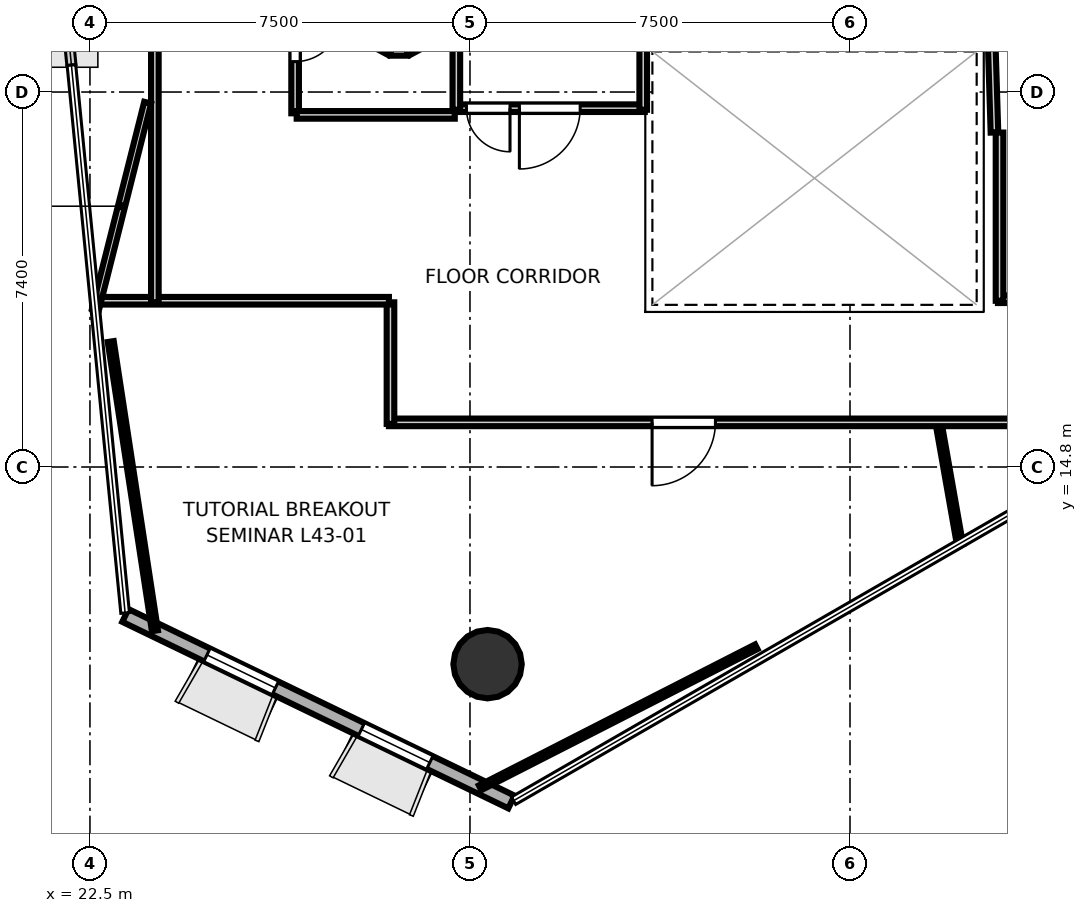
"""IFC4 building model, lengths in metres.
Left out: names, types, materials, properties, quantities, classifications, styles, units other than length and angle.
Written with IfcOpenShell. Run it as: python <this file> out.ifc"""

import sys

from ifc_helpers import new_model, si_unit, direction, frame, frame_2d, origin, origin_2d, place, context, subcontext, project, spatial, rectangle, hollow_circle, extrude, element, fill, save


model = new_model("IFC4")
c1 = context("Model", 3, precision=1e-05, world=origin(), true_north=direction((0.0, 1.0)))
c2 = subcontext(c1, "Body", "Model", "MODEL_VIEW")
j1 = project(units=[si_unit("LENGTHUNIT", "METRE"), si_unit("PLANEANGLEUNIT", "RADIAN")], contexts=[c1])
p1 = place(None, origin())
s1 = spatial("IfcSite", under=j1, at=p1, CompositionType="ELEMENT")
p2 = place(p1, origin())
s2 = spatial("IfcBuilding", under=s1, at=p2, CompositionType="ELEMENT")
p3 = place(p2, frame((0.0, 0.0, 169.8)))
s3 = spatial("IfcBuildingStorey", under=s2, at=p3, CompositionType="ELEMENT", Elevation=169.8)
p4 = place(p3, frame((30.347, 10.909, 0.0), z_axis=(0.0, 0.0, 1.0), x_axis=(1.0, 0.0, 0.0)))
e1 = element("IfcColumn", 1, at=p4, inside=s3, PredefinedType="COLUMN", context=c2, shape_type="SweptSolid", body=[
    extrude(hollow_circle(Radius=0.675, WallThickness=0.032, at=origin_2d()), origin(), (0.0, 0.0, 1.0), 3.7),
])
p5 = place(p3, frame((23.199, 11.87, 0.0), z_axis=(0.0, 0.0, 1.0), x_axis=(0.90042186544, -0.435017774622, 0.0)))
e2 = element("IfcWall", 2, at=p5, inside=s3, PredefinedType="SOLIDWALL", context=c2, shape_type="SweptSolid", body=[
    extrude(rectangle(XDim=8.46, YDim=0.28, at=frame_2d((4.23, 0.0))), origin(), (0.0, 0.0, 1.0), 3.52),
])
p6 = place(p5, frame((1.788, 0.0, 0.85)))
e3 = element("IfcOpeningElement", 3, at=p6, cuts=e2, PredefinedType="OPENING", context=c2, shape_type="SweptSolid", body=[
    extrude(rectangle(XDim=1.5, YDim=2.1, at=frame_2d((0.75, 1.05))), frame((0.0, 0.15, 0.0), z_axis=(0.0, -1.0, 0.0), x_axis=(1.0, 0.0, 0.0)), (0.0, 0.0, 1.0), 0.3),
])
p7 = place(p5, frame((5.172, 0.0, 0.85)))
e4 = element("IfcOpeningElement", 4, at=p7, cuts=e2, PredefinedType="OPENING", context=c2, shape_type="SweptSolid", body=[
    extrude(rectangle(XDim=1.5, YDim=2.1, at=frame_2d((0.75, 1.05))), frame((0.0, 0.15, 0.0), z_axis=(0.0, -1.0, 0.0), x_axis=(1.0, 0.0, 0.0)), (0.0, 0.0, 1.0), 0.3),
])
p8 = place(p3, frame((33.45, 21.881, 0.0), z_axis=(0.0, 0.0, 1.0), x_axis=(-1.0, 0.0, 0.0)))
e5 = element("IfcWall", 5, at=p8, inside=s3, PredefinedType="PARTITIONING", context=c2, shape_type="SweptSolid", body=[
    extrude(rectangle(XDim=3.75, YDim=0.15, at=frame_2d((1.875, 0.0))), origin(), (0.0, 0.0, 1.0), 2.84),
])
p9 = place(p8, frame((1.275, 0.0, 0.0)))
e6 = element("IfcOpeningElement", 6, at=p9, cuts=e5, PredefinedType="OPENING", context=c2, shape_type="SweptSolid", body=[
    extrude(rectangle(XDim=1.2, YDim=2.15, at=frame_2d((0.6, 1.075))), frame((0.0, 0.085, 0.0), z_axis=(0.0, -1.0, 0.0), x_axis=(1.0, 0.0, 0.0)), (0.0, 0.0, 1.0), 0.17),
])
p10 = place(p8, frame((2.66, 0.0, 0.0)))
e7 = element("IfcOpeningElement", 7, at=p10, cuts=e5, PredefinedType="OPENING", context=c2, shape_type="SweptSolid", body=[
    extrude(rectangle(XDim=0.86, YDim=2.05, at=frame_2d((0.43, 1.025))), frame((0.0, 0.085, 0.0), z_axis=(0.0, -1.0, 0.0), x_axis=(1.0, 0.0, 0.0)), (0.0, 0.0, 1.0), 0.17),
])
for number, where, z_axis, x_axis in (
    (8, (29.731, 21.85, 0.0), (0.0, 0.0, 1.0), (0.0, 1.0, 0.0)),
    (9, (33.419, 24.442, 0.0), (0.0, 0.0, 1.0), (0.0, -1.0, 0.0)),
):
    element("IfcWall", number, at=place(p3, frame(where, z_axis=z_axis, x_axis=x_axis)), inside=s3, PredefinedType="PARTITIONING", context=c2, shape_type="SweptSolid", body=[
        extrude(rectangle(XDim=2.592, YDim=0.15, at=frame_2d((1.296, 0.0))), origin(), (0.0, 0.0, 1.0), 2.84),
    ])
p11 = place(p3, frame((40.351, 21.401, 0.0), z_axis=(0.0, 0.0, 1.0), x_axis=(-0.031058045979, 0.999517582527, 0.0)))
e10 = element("IfcWall", 10, at=p11, inside=s3, PredefinedType="PARTITIONING", context=c2, shape_type="SweptSolid", body=[
    extrude(rectangle(XDim=1.682, YDim=0.15, at=frame_2d((0.841, 0.0))), origin(), (0.0, 0.0, 1.0), 2.84),
])
p12 = place(p3, frame((42.55, 18.111, 0.0), z_axis=(0.0, 0.0, 1.0), x_axis=(-1.0, 0.0, 0.0)))
e11 = element("IfcWall", 11, at=p12, inside=s3, PredefinedType="PARTITIONING", context=c2, shape_type="SweptSolid", body=[
    extrude(rectangle(XDim=2.13, YDim=0.15, at=frame_2d((1.065, 0.0))), origin(), (0.0, 0.0, 1.0), 2.84),
])
p13 = place(p12, frame((0.465, 0.0, 0.0)))
e12 = element("IfcOpeningElement", 12, at=p13, cuts=e11, PredefinedType="OPENING", context=c2, shape_type="SweptSolid", body=[
    extrude(rectangle(XDim=1.2, YDim=2.15, at=frame_2d((0.6, 1.075))), frame((0.0, 0.085, 0.0), z_axis=(0.0, -1.0, 0.0), x_axis=(1.0, 0.0, 0.0)), (0.0, 0.0, 1.0), 0.17),
])
p14 = place(p3, frame((40.451, 18.08, 0.0), z_axis=(0.0, 0.0, 1.0), x_axis=(0.0, 1.0, 0.0)))
e13 = element("IfcWall", 13, at=p14, inside=s3, PredefinedType="PARTITIONING", context=c2, shape_type="SweptSolid", body=[
    extrude(rectangle(XDim=3.32, YDim=0.15, at=frame_2d((1.66, 0.0))), origin(), (0.0, 0.0, 1.0), 2.84),
])
p15 = place(p3, frame((26.549, 25.0, 0.0), z_axis=(0.0, 0.0, 1.0), x_axis=(0.0, -1.0, 0.0)))
e14 = element("IfcWall", 14, at=p15, inside=s3, PredefinedType="PARTITIONING", context=c2, shape_type="SweptSolid", body=[
    extrude(rectangle(XDim=3.22, YDim=0.15, at=frame_2d((1.61, 0.0))), origin(), (0.0, 0.0, 1.0), 2.84),
])
p16 = place(p15, frame((1.3, 0.0, 0.0)))
e15 = element("IfcOpeningElement", 15, at=p16, cuts=e14, PredefinedType="OPENING", context=c2, shape_type="SweptSolid", body=[
    extrude(rectangle(XDim=0.9, YDim=2.1, at=frame_2d((0.45, 1.05))), frame((0.0, 0.085, 0.0), z_axis=(0.0, -1.0, 0.0), x_axis=(1.0, 0.0, 0.0)), (0.0, 0.0, 1.0), 0.17),
])
p17 = place(p3, frame((26.58, 21.749, 0.0), z_axis=(0.0, 0.0, 1.0), x_axis=(1.0, 0.0, 0.0)))
e16 = element("IfcWall", 16, at=p17, inside=s3, PredefinedType="PARTITIONING", context=c2, shape_type="SweptSolid", body=[
    extrude(rectangle(XDim=3.12, YDim=0.15, at=frame_2d((1.56, 0.0))), origin(), (0.0, 0.0, 1.0), 2.84),
])
p18 = place(p3, frame((43.837, 15.681, 0.0), z_axis=(0.0, 0.0, 1.0), x_axis=(-1.0, 0.0, 0.0)))
e17 = element("IfcWall", 17, at=p18, inside=s3, PredefinedType="PARTITIONING", context=c2, shape_type="SweptSolid", body=[
    extrude(rectangle(XDim=15.437, YDim=0.15, at=frame_2d((7.719, 0.0))), origin(), (0.0, 0.0, 1.0), 2.84),
])
p19 = place(p18, frame((8.993, 0.0, 0.0)))
e18 = element("IfcOpeningElement", 18, at=p19, cuts=e17, PredefinedType="OPENING", context=c2, shape_type="SweptSolid", body=[
    extrude(rectangle(XDim=1.25, YDim=2.2, at=frame_2d((0.625, 1.1))), frame((0.0, 0.085, 0.0), z_axis=(0.0, -1.0, 0.0), x_axis=(1.0, 0.0, 0.0)), (0.0, 0.0, 1.0), 0.17),
])
p20 = place(p3, frame((28.431, 15.65, 0.0), z_axis=(0.0, 0.0, 1.0), x_axis=(0.0, 1.0, 0.0)))
e19 = element("IfcWall", 19, at=p20, inside=s3, PredefinedType="PARTITIONING", context=c2, shape_type="SweptSolid", body=[
    extrude(rectangle(XDim=2.4, YDim=0.15, at=frame_2d((1.2, 0.0))), origin(), (0.0, 0.0, 1.0), 2.84),
])
p21 = place(p3, frame((28.4, 18.081, 0.0), z_axis=(0.0, 0.0, 1.0), x_axis=(-1.0, 0.0, 0.0)))
e20 = element("IfcWall", 20, at=p21, inside=s3, PredefinedType="PARTITIONING", context=c2, shape_type="SweptSolid", body=[
    extrude(rectangle(XDim=5.83, YDim=0.15, at=frame_2d((2.915, 0.0))), origin(), (0.0, 0.0, 1.0), 2.84),
])
p22 = place(p3, frame((23.781, 18.05, 0.0), z_axis=(0.0, 0.0, 1.0), x_axis=(0.0, 1.0, 0.0)))
e21 = element("IfcWall", 21, at=p22, inside=s3, PredefinedType="PARTITIONING", context=c2, shape_type="SweptSolid", body=[
    extrude(rectangle(XDim=5.906, YDim=0.15, at=frame_2d((2.953, 0.0))), origin(), (0.0, 0.0, 1.0), 2.84),
])
p23 = place(p3, frame((23.639, 21.99, 0.0), z_axis=(0.0, 0.0, 1.0), x_axis=(-0.24461989364, -0.969619052843, 0.0)))
e22 = element("IfcWall", 22, at=p23, inside=s3, PredefinedType="PARTITIONING", context=c2, shape_type="SweptSolid", body=[
    extrude(rectangle(XDim=4.216, YDim=0.14, at=frame_2d((2.108, 0.0))), origin(), (0.0, 0.0, 1.0), 2.84),
])
p24 = place(p3, frame((39.266, 15.565, 0.0), z_axis=(0.0, 0.0, 1.0), x_axis=(0.173617967091, -0.984813079474, 0.0)))
e23 = element("IfcWall", 23, at=p24, inside=s3, PredefinedType="PARTITIONING", context=c2, shape_type="SweptSolid", body=[
    extrude(rectangle(XDim=2.33, YDim=0.12, at=frame_2d((1.165, 0.0))), origin(), (0.0, 0.0, 1.0), 2.84),
])
p25 = place(p3, frame((35.651, 11.252, 0.0), z_axis=(0.0, 0.0, 1.0), x_axis=(-0.890678474554, -0.454633759158, 0.0)))
e24 = element("IfcWall", 24, at=p25, inside=s3, PredefinedType="PARTITIONING", context=c2, shape_type="SweptSolid", body=[
    extrude(rectangle(XDim=6.12, YDim=0.105, at=frame_2d((3.06, 0.0))), origin(), (0.0, 0.0, 1.0), 2.84),
])
p26 = place(p3, frame((23.782, 11.57, 0.0), z_axis=(0.0, 0.0, 1.0), x_axis=(-0.151071893371, 0.988522778207, 0.0)))
e25 = element("IfcWall", 25, at=p26, inside=s3, PredefinedType="PARTITIONING", context=c2, shape_type="SweptSolid", body=[
    extrude(rectangle(XDim=5.772, YDim=0.12, at=frame_2d((2.886, 0.0))), origin(), (0.0, 0.0, 1.0), 2.84),
])
p27 = place(p3, frame((27.995, 23.232, 0.0), z_axis=(0.0, 0.0, 1.0), x_axis=(0.88190639713, -0.471424550379, 0.0)))
e26 = element("IfcWall", 26, at=p27, inside=s3, PredefinedType="PLUMBINGWALL", context=c2, shape_type="SweptSolid", body=[
    extrude(rectangle(XDim=0.485, YDim=0.165, at=frame_2d((0.242, 0.0))), origin(), (0.0, 0.0, 1.0), 2.84),
])
p28 = place(p3, frame((28.437, 23.0, 0.0), z_axis=(0.0, 0.0, 1.0), x_axis=(1.0, 0.0, 0.0)))
e27 = element("IfcWall", 27, at=p28, inside=s3, PredefinedType="PLUMBINGWALL", context=c2, shape_type="SweptSolid", body=[
    extrude(rectangle(XDim=0.326, YDim=0.165, at=frame_2d((0.163, 0.0))), origin(), (0.0, 0.0, 1.0), 2.84),
])
p29 = place(p3, frame((28.778, 23.004, 0.0), z_axis=(0.0, 0.0, 1.0), x_axis=(0.88190639713, 0.471424550379, 0.0)))
e28 = element("IfcWall", 28, at=p29, inside=s3, PredefinedType="PLUMBINGWALL", context=c2, shape_type="SweptSolid", body=[
    extrude(rectangle(XDim=0.485, YDim=0.165, at=frame_2d((0.242, 0.0))), origin(), (0.0, 0.0, 1.0), 2.84),
])
p30 = place(p9, origin())
e29 = element("IfcDoor", 29, at=p30, inside=s3, OperationType="SINGLE_SWING_RIGHT", PredefinedType="DOOR", context=c2, shape_type="SweptSolid", body=[
    extrude(rectangle(XDim=1.2, YDim=2.15, at=frame_2d((0.6, 1.075))), frame((0.0, 0.025, 0.0), z_axis=(0.0, -1.0, 0.0), x_axis=(1.0, 0.0, 0.0)), (0.0, 0.0, 1.0), 0.05),
])
fill(e6, e29)
p31 = place(p10, origin())
e30 = element("IfcDoor", 30, at=p31, inside=s3, OperationType="SINGLE_SWING_LEFT", PredefinedType="DOOR", context=c2, shape_type="SweptSolid", body=[
    extrude(rectangle(XDim=0.86, YDim=2.05, at=frame_2d((0.43, 1.025))), frame((0.0, 0.025, 0.0), z_axis=(0.0, -1.0, 0.0), x_axis=(1.0, 0.0, 0.0)), (0.0, 0.0, 1.0), 0.05),
])
fill(e7, e30)
p32 = place(p19, origin())
e31 = element("IfcDoor", 31, at=p32, inside=s3, OperationType="SINGLE_SWING_RIGHT", PredefinedType="DOOR", context=c2, shape_type="SweptSolid", body=[
    extrude(rectangle(XDim=1.25, YDim=2.2, at=frame_2d((0.625, 1.1))), frame((0.0, 0.025, 0.0), z_axis=(0.0, -1.0, 0.0), x_axis=(1.0, 0.0, 0.0)), (0.0, 0.0, 1.0), 0.05),
])
fill(e18, e31)
p33 = place(p16, origin())
e32 = element("IfcDoor", 32, at=p33, inside=s3, OperationType="SINGLE_SWING_LEFT", PredefinedType="DOOR", context=c2, shape_type="SweptSolid", body=[
    extrude(rectangle(XDim=0.9, YDim=2.1, at=frame_2d((0.45, 1.05))), frame((0.0, 0.025, 0.0), z_axis=(0.0, -1.0, 0.0), x_axis=(1.0, 0.0, 0.0)), (0.0, 0.0, 1.0), 0.05),
])
fill(e15, e32)
p34 = place(p6, origin())
e33 = element("IfcWindow", 33, at=p34, inside=s3, PartitioningType="SINGLE_PANEL", PredefinedType="WINDOW", context=c2, shape_type="SweptSolid", body=[
    extrude(rectangle(XDim=1.5, YDim=2.1, at=frame_2d((0.75, 1.05))), frame((0.0, 0.03, 0.0), z_axis=(0.0, -1.0, 0.0), x_axis=(1.0, 0.0, 0.0)), (0.0, 0.0, 1.0), 0.06),
])
fill(e3, e33)
p35 = place(p7, origin())
e34 = element("IfcWindow", 34, at=p35, inside=s3, PartitioningType="SINGLE_PANEL", PredefinedType="WINDOW", context=c2, shape_type="SweptSolid", body=[
    extrude(rectangle(XDim=1.5, YDim=2.1, at=frame_2d((0.75, 1.05))), frame((0.0, 0.03, 0.0), z_axis=(0.0, -1.0, 0.0), x_axis=(1.0, 0.0, 0.0)), (0.0, 0.0, 1.0), 0.06),
])
fill(e4, e34)
save(model, sys.argv[1])
